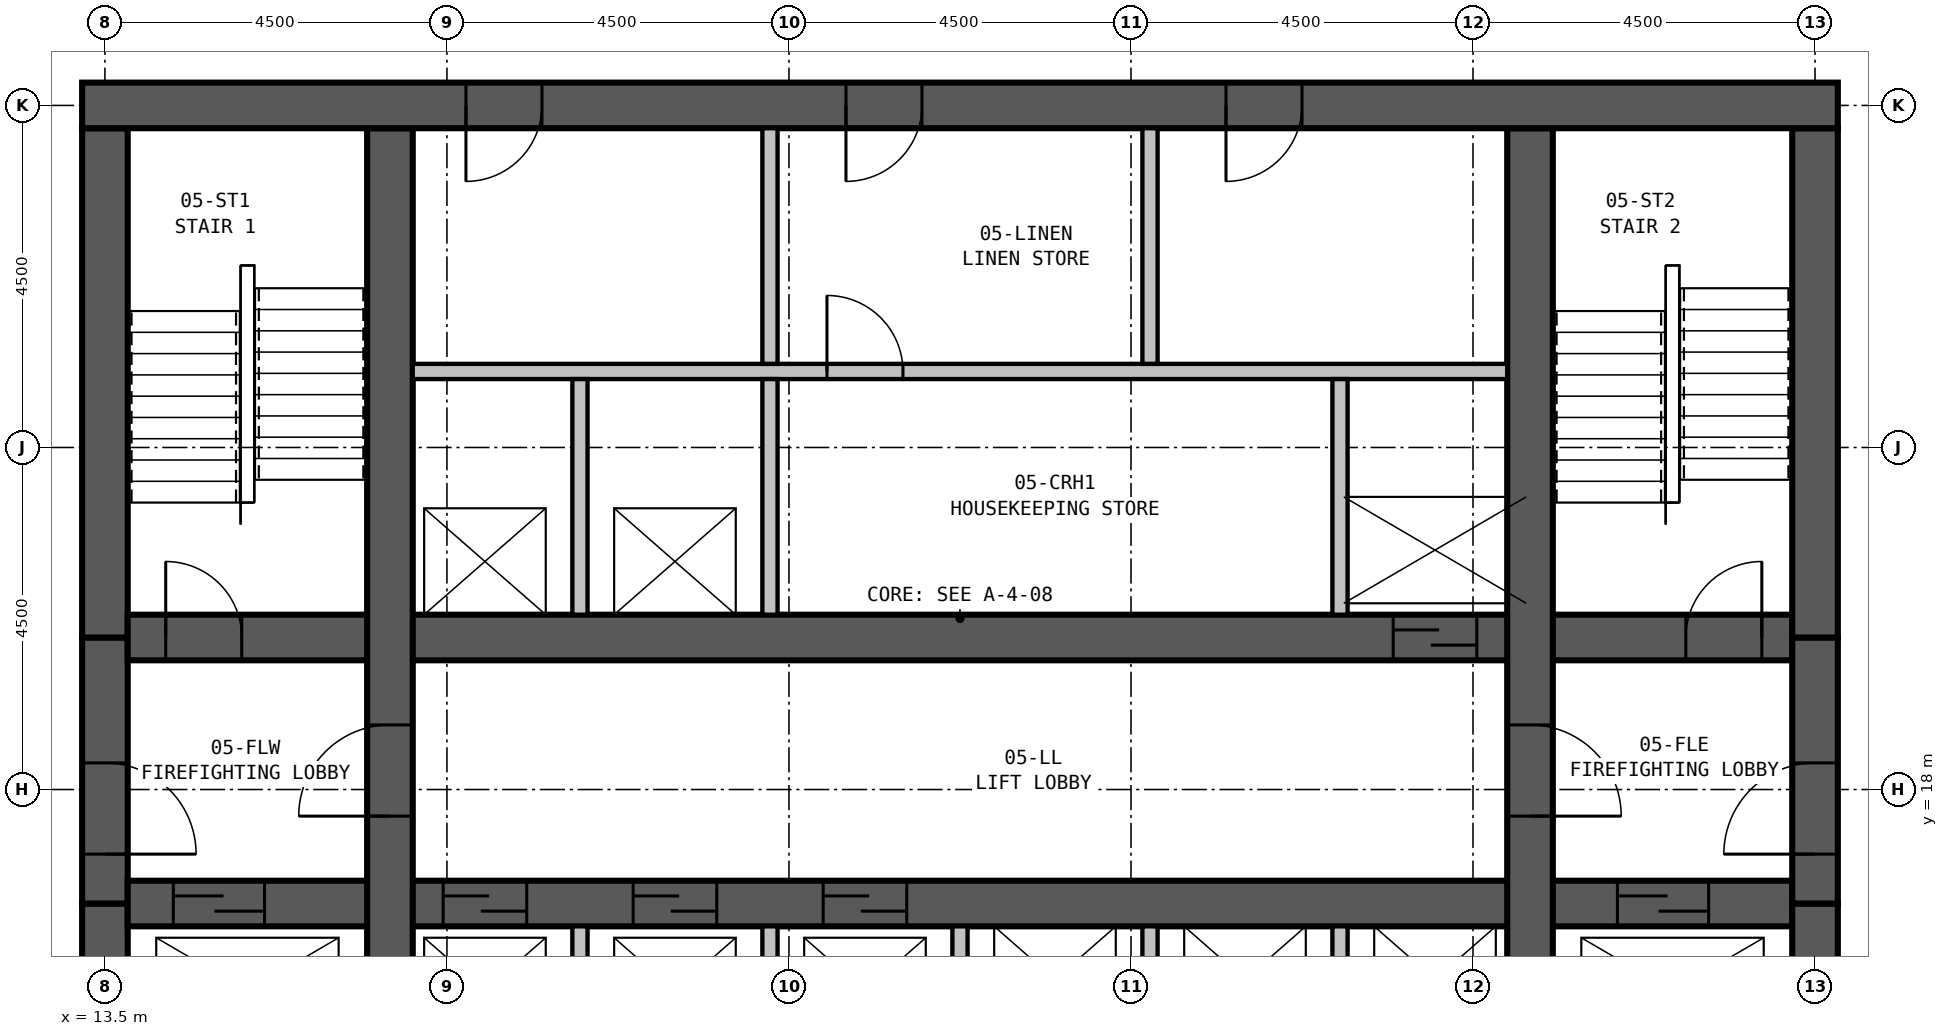
"""IFC4 building model, lengths in metres.
Left out: names, types, materials, properties, quantities, classifications, styles, units other than length and angle.
Written with IfcOpenShell. Run it as: python <this file> out.ifc"""

import sys

from ifc_helpers import new_model, si_unit, direction, frame, frame_2d, origin, place, context, subcontext, project, spatial, rectangle, extrude, element, fill, save


model = new_model("IFC4")
c1 = context("Model", 3, precision=1e-05, world=origin(), true_north=direction((0.0, 1.0)))
c2 = subcontext(c1, "Body", "Model", "MODEL_VIEW")
j1 = project(units=[si_unit("LENGTHUNIT", "METRE"), si_unit("PLANEANGLEUNIT", "RADIAN")], contexts=[c1])
p1 = place(None, origin())
s1 = spatial("IfcSite", under=j1, at=p1, CompositionType="ELEMENT")
p2 = place(p1, origin())
s2 = spatial("IfcBuilding", under=s1, at=p2, CompositionType="ELEMENT")
p3 = place(p2, frame((0.0, 0.0, 29.7)))
s3 = spatial("IfcBuildingStorey", under=s2, at=p3, CompositionType="ELEMENT", Elevation=29.7)
p4 = place(p3, frame((36.3, 27.0, 0.0), z_axis=(0.0, 0.0, 1.0), x_axis=(-1.0, 0.0, 0.0)))
e1 = element("IfcWall", 1, at=p4, inside=s3, PredefinedType="SHEAR", context=c2, shape_type="SweptSolid", body=[
    extrude(rectangle(XDim=23.1, YDim=0.6, at=frame_2d((11.55, 0.0))), origin(), (0.0, 0.0, 1.0), 3.5),
])
p5 = place(p4, frame((17.05, 0.0, 0.0)))
e2 = element("IfcOpeningElement", 2, at=p5, cuts=e1, PredefinedType="OPENING", context=c2, shape_type="SweptSolid", body=[
    extrude(rectangle(XDim=1.0, YDim=2.1, at=frame_2d((0.5, 1.05))), frame((0.0, 0.31, 0.0), z_axis=(0.0, -1.0, 0.0), x_axis=(1.0, 0.0, 0.0)), (0.0, 0.0, 1.0), 0.62),
])
p6 = place(p4, frame((12.05, 0.0, 0.0)))
e3 = element("IfcOpeningElement", 3, at=p6, cuts=e1, PredefinedType="OPENING", context=c2, shape_type="SweptSolid", body=[
    extrude(rectangle(XDim=1.0, YDim=2.1, at=frame_2d((0.5, 1.05))), frame((0.0, 0.31, 0.0), z_axis=(0.0, -1.0, 0.0), x_axis=(1.0, 0.0, 0.0)), (0.0, 0.0, 1.0), 0.62),
])
p7 = place(p4, frame((7.05, 0.0, 0.0)))
e4 = element("IfcOpeningElement", 4, at=p7, cuts=e1, PredefinedType="OPENING", context=c2, shape_type="SweptSolid", body=[
    extrude(rectangle(XDim=1.0, YDim=2.1, at=frame_2d((0.5, 1.05))), frame((0.0, 0.31, 0.0), z_axis=(0.0, -1.0, 0.0), x_axis=(1.0, 0.0, 0.0)), (0.0, 0.0, 1.0), 0.62),
])
p8 = place(p3, frame((17.25, 13.8, 0.0), z_axis=(0.0, 0.0, 1.0), x_axis=(0.0, 1.0, 0.0)))
e5 = element("IfcWall", 5, at=p8, inside=s3, PredefinedType="SHEAR", context=c2, shape_type="SweptSolid", body=[
    extrude(rectangle(XDim=12.9, YDim=0.6, at=frame_2d((6.45, 0.0))), origin(), (0.0, 0.0, 1.0), 3.5),
])
p9 = place(p8, frame((3.85, 0.0, 0.0)))
e6 = element("IfcOpeningElement", 6, at=p9, cuts=e5, PredefinedType="OPENING", context=c2, shape_type="SweptSolid", body=[
    extrude(rectangle(XDim=1.2, YDim=2.1, at=frame_2d((0.6, 1.05))), frame((0.0, 0.31, 0.0), z_axis=(0.0, -1.0, 0.0), x_axis=(1.0, 0.0, 0.0)), (0.0, 0.0, 1.0), 0.62),
])
p10 = place(p3, frame((32.25, 13.8, 0.0), z_axis=(0.0, 0.0, 1.0), x_axis=(0.0, 1.0, 0.0)))
e7 = element("IfcWall", 7, at=p10, inside=s3, PredefinedType="SHEAR", context=c2, shape_type="SweptSolid", body=[
    extrude(rectangle(XDim=12.9, YDim=0.6, at=frame_2d((6.45, 0.0))), origin(), (0.0, 0.0, 1.0), 3.5),
])
p11 = place(p10, frame((5.05, 0.0, 0.0), z_axis=(0.0, 0.0, 1.0), x_axis=(-1.0, 0.0, 0.0)))
e8 = element("IfcOpeningElement", 8, at=p11, cuts=e7, PredefinedType="OPENING", context=c2, shape_type="SweptSolid", body=[
    extrude(rectangle(XDim=1.2, YDim=2.1, at=frame_2d((0.6, 1.05))), frame((0.0, 0.31, 0.0), z_axis=(0.0, -1.0, 0.0), x_axis=(1.0, 0.0, 0.0)), (0.0, 0.0, 1.0), 0.62),
])
p12 = place(p3, frame((13.8, 16.5, 0.0), z_axis=(0.0, 0.0, 1.0), x_axis=(1.0, 0.0, 0.0)))
e9 = element("IfcWall", 9, at=p12, inside=s3, PredefinedType="SHEAR", context=c2, shape_type="SweptSolid", body=[
    extrude(rectangle(XDim=21.9, YDim=0.6, at=frame_2d((10.95, 0.0))), origin(), (0.0, 0.0, 1.0), 3.5),
])
p13 = place(p12, frame((4.15, 0.0, 0.0)))
e10 = element("IfcOpeningElement", 10, at=p13, cuts=e9, PredefinedType="OPENING", context=c2, shape_type="SweptSolid", body=[
    extrude(rectangle(XDim=1.1, YDim=2.1, at=frame_2d((0.55, 1.05))), frame((0.0, 0.31, 0.0), z_axis=(0.0, -1.0, 0.0), x_axis=(1.0, 0.0, 0.0)), (0.0, 0.0, 1.0), 0.62),
])
p14 = place(p12, frame((6.65, 0.0, 0.0)))
e11 = element("IfcOpeningElement", 11, at=p14, cuts=e9, PredefinedType="OPENING", context=c2, shape_type="SweptSolid", body=[
    extrude(rectangle(XDim=1.1, YDim=2.1, at=frame_2d((0.55, 1.05))), frame((0.0, 0.31, 0.0), z_axis=(0.0, -1.0, 0.0), x_axis=(1.0, 0.0, 0.0)), (0.0, 0.0, 1.0), 0.62),
])
p15 = place(p12, frame((9.15, 0.0, 0.0)))
e12 = element("IfcOpeningElement", 12, at=p15, cuts=e9, PredefinedType="OPENING", context=c2, shape_type="SweptSolid", body=[
    extrude(rectangle(XDim=1.1, YDim=2.1, at=frame_2d((0.55, 1.05))), frame((0.0, 0.31, 0.0), z_axis=(0.0, -1.0, 0.0), x_axis=(1.0, 0.0, 0.0)), (0.0, 0.0, 1.0), 0.62),
])
p16 = place(p12, frame((0.6, 0.0, 0.0)))
e13 = element("IfcOpeningElement", 13, at=p16, cuts=e9, PredefinedType="OPENING", context=c2, shape_type="SweptSolid", body=[
    extrude(rectangle(XDim=1.2, YDim=2.1, at=frame_2d((0.6, 1.05))), frame((0.0, 0.31, 0.0), z_axis=(0.0, -1.0, 0.0), x_axis=(1.0, 0.0, 0.0)), (0.0, 0.0, 1.0), 0.62),
])
p17 = place(p12, frame((19.6, 0.0, 0.0)))
e14 = element("IfcOpeningElement", 14, at=p17, cuts=e9, PredefinedType="OPENING", context=c2, shape_type="SweptSolid", body=[
    extrude(rectangle(XDim=1.2, YDim=2.1, at=frame_2d((0.6, 1.05))), frame((0.0, 0.31, 0.0), z_axis=(0.0, -1.0, 0.0), x_axis=(1.0, 0.0, 0.0)), (0.0, 0.0, 1.0), 0.62),
])
p18 = place(p3, frame((13.8, 20.0, 0.0), z_axis=(0.0, 0.0, 1.0), x_axis=(1.0, 0.0, 0.0)))
e15 = element("IfcWall", 15, at=p18, inside=s3, PredefinedType="SHEAR", context=c2, shape_type="SweptSolid", body=[
    extrude(rectangle(XDim=21.9, YDim=0.6, at=frame_2d((10.95, 0.0))), origin(), (0.0, 0.0, 1.0), 3.5),
])
p19 = place(p18, frame((0.5, 0.0, 0.0)))
e16 = element("IfcOpeningElement", 16, at=p19, cuts=e15, PredefinedType="OPENING", context=c2, shape_type="SweptSolid", body=[
    extrude(rectangle(XDim=1.0, YDim=2.1, at=frame_2d((0.5, 1.05))), frame((0.0, 0.31, 0.0), z_axis=(0.0, -1.0, 0.0), x_axis=(1.0, 0.0, 0.0)), (0.0, 0.0, 1.0), 0.62),
])
p20 = place(p18, frame((20.5, 0.0, 0.0)))
e17 = element("IfcOpeningElement", 17, at=p20, cuts=e15, PredefinedType="OPENING", context=c2, shape_type="SweptSolid", body=[
    extrude(rectangle(XDim=1.0, YDim=2.1, at=frame_2d((0.5, 1.05))), frame((0.0, 0.31, 0.0), z_axis=(0.0, -1.0, 0.0), x_axis=(1.0, 0.0, 0.0)), (0.0, 0.0, 1.0), 0.62),
])
p21 = place(p18, frame((16.65, 0.0, 0.0)))
e18 = element("IfcOpeningElement", 18, at=p21, cuts=e15, PredefinedType="OPENING", context=c2, shape_type="SweptSolid", body=[
    extrude(rectangle(XDim=1.1, YDim=2.1, at=frame_2d((0.55, 1.05))), frame((0.0, 0.31, 0.0), z_axis=(0.0, -1.0, 0.0), x_axis=(1.0, 0.0, 0.0)), (0.0, 0.0, 1.0), 0.62),
])
p22 = place(p3, frame((13.5, 26.7, 0.0), z_axis=(0.0, 0.0, 1.0), x_axis=(0.0, -1.0, 0.0)))
e19 = element("IfcWall", 19, at=p22, inside=s3, PredefinedType="SHEAR", context=c2, shape_type="SweptSolid", body=[
    extrude(rectangle(XDim=6.7, YDim=0.6, at=frame_2d((3.35, 0.0))), origin(), (0.0, 0.0, 1.0), 3.5),
])
p23 = place(p3, frame((13.5, 20.0, 0.0), z_axis=(0.0, 0.0, 1.0), x_axis=(0.0, -1.0, 0.0)))
e20 = element("IfcWall", 20, at=p23, inside=s3, PredefinedType="SHEAR", context=c2, shape_type="SweptSolid", body=[
    extrude(rectangle(XDim=3.5, YDim=0.6, at=frame_2d((1.75, 0.0))), origin(), (0.0, 0.0, 1.0), 3.5),
])
p24 = place(p23, frame((1.65, 0.0, 0.0)))
e21 = element("IfcOpeningElement", 21, at=p24, cuts=e20, PredefinedType="OPENING", context=c2, shape_type="SweptSolid", body=[
    extrude(rectangle(XDim=1.2, YDim=2.1, at=frame_2d((0.6, 1.05))), frame((0.0, 0.31, 0.0), z_axis=(0.0, -1.0, 0.0), x_axis=(1.0, 0.0, 0.0)), (0.0, 0.0, 1.0), 0.62),
])
for number, where, z_axis, x_axis in (
    (22, (13.5, 16.5, 0.0), (0.0, 0.0, 1.0), (0.0, -1.0, 0.0)),
    (23, (36.0, 13.8, 0.0), (0.0, 0.0, 1.0), (0.0, 1.0, 0.0)),
):
    element("IfcWall", number, at=place(p3, frame(where, z_axis=z_axis, x_axis=x_axis)), inside=s3, PredefinedType="SHEAR", context=c2, shape_type="SweptSolid", body=[
        extrude(rectangle(XDim=2.7, YDim=0.6, at=frame_2d((1.35, 0.0))), origin(), (0.0, 0.0, 1.0), 3.5),
    ])
p25 = place(p3, frame((36.0, 16.5, 0.0), z_axis=(0.0, 0.0, 1.0), x_axis=(0.0, 1.0, 0.0)))
e24 = element("IfcWall", 24, at=p25, inside=s3, PredefinedType="SHEAR", context=c2, shape_type="SweptSolid", body=[
    extrude(rectangle(XDim=3.5, YDim=0.6, at=frame_2d((1.75, 0.0))), origin(), (0.0, 0.0, 1.0), 3.5),
])
p26 = place(p25, frame((0.65, 0.0, 0.0)))
e25 = element("IfcOpeningElement", 25, at=p26, cuts=e24, PredefinedType="OPENING", context=c2, shape_type="SweptSolid", body=[
    extrude(rectangle(XDim=1.2, YDim=2.1, at=frame_2d((0.6, 1.05))), frame((0.0, 0.31, 0.0), z_axis=(0.0, -1.0, 0.0), x_axis=(1.0, 0.0, 0.0)), (0.0, 0.0, 1.0), 0.62),
])
p27 = place(p3, frame((36.0, 20.0, 0.0), z_axis=(0.0, 0.0, 1.0), x_axis=(0.0, 1.0, 0.0)))
e26 = element("IfcWall", 26, at=p27, inside=s3, PredefinedType="SHEAR", context=c2, shape_type="SweptSolid", body=[
    extrude(rectangle(XDim=6.7, YDim=0.6, at=frame_2d((3.35, 0.0))), origin(), (0.0, 0.0, 1.0), 3.5),
])
p28 = place(p3, frame((19.75, 13.8, 0.0), z_axis=(0.0, 0.0, 1.0), x_axis=(0.0, 1.0, 0.0)))
e27 = element("IfcWall", 27, at=p28, inside=s3, PredefinedType="PARTITIONING", context=c2, shape_type="SweptSolid", body=[
    extrude(rectangle(XDim=2.4, YDim=0.2, at=frame_2d((1.2, 0.0))), origin(), (0.0, 0.0, 1.0), 3.25),
])
p29 = place(p3, frame((19.75, 20.3, 0.0), z_axis=(0.0, 0.0, 1.0), x_axis=(0.0, 1.0, 0.0)))
e28 = element("IfcWall", 28, at=p29, inside=s3, PredefinedType="PARTITIONING", context=c2, shape_type="SweptSolid", body=[
    extrude(rectangle(XDim=3.1, YDim=0.2, at=frame_2d((1.55, 0.0))), origin(), (0.0, 0.0, 1.0), 3.25),
])
p30 = place(p3, frame((22.25, 13.8, 0.0), z_axis=(0.0, 0.0, 1.0), x_axis=(0.0, 1.0, 0.0)))
e29 = element("IfcWall", 29, at=p30, inside=s3, PredefinedType="PARTITIONING", context=c2, shape_type="SweptSolid", body=[
    extrude(rectangle(XDim=2.4, YDim=0.2, at=frame_2d((1.2, 0.0))), origin(), (0.0, 0.0, 1.0), 3.25),
])
p31 = place(p3, frame((22.25, 20.3, 0.0), z_axis=(0.0, 0.0, 1.0), x_axis=(0.0, 1.0, 0.0)))
e30 = element("IfcWall", 30, at=p31, inside=s3, PredefinedType="PARTITIONING", context=c2, shape_type="SweptSolid", body=[
    extrude(rectangle(XDim=3.1, YDim=0.2, at=frame_2d((1.55, 0.0))), origin(), (0.0, 0.0, 1.0), 3.25),
])
for number, where, z_axis, x_axis in (
    (31, (24.75, 13.8, 0.0), (0.0, 0.0, 1.0), (0.0, 1.0, 0.0)),
    (32, (27.25, 13.8, 0.0), (0.0, 0.0, 1.0), (0.0, 1.0, 0.0)),
    (33, (29.75, 13.8, 0.0), (0.0, 0.0, 1.0), (0.0, 1.0, 0.0)),
):
    element("IfcWall", number, at=place(p3, frame(where, z_axis=z_axis, x_axis=x_axis)), inside=s3, PredefinedType="PARTITIONING", context=c2, shape_type="SweptSolid", body=[
        extrude(rectangle(XDim=2.4, YDim=0.2, at=frame_2d((1.2, 0.0))), origin(), (0.0, 0.0, 1.0), 3.25),
    ])
p32 = place(p3, frame((29.75, 20.3, 0.0), z_axis=(0.0, 0.0, 1.0), x_axis=(0.0, 1.0, 0.0)))
e34 = element("IfcWall", 34, at=p32, inside=s3, PredefinedType="PARTITIONING", context=c2, shape_type="SweptSolid", body=[
    extrude(rectangle(XDim=3.1, YDim=0.2, at=frame_2d((1.55, 0.0))), origin(), (0.0, 0.0, 1.0), 3.25),
])
p33 = place(p3, frame((17.55, 23.5, 0.0), z_axis=(0.0, 0.0, 1.0), x_axis=(1.0, 0.0, 0.0)))
e35 = element("IfcWall", 35, at=p33, inside=s3, PredefinedType="PARTITIONING", context=c2, shape_type="SweptSolid", body=[
    extrude(rectangle(XDim=14.4, YDim=0.2, at=frame_2d((7.2, 0.0))), origin(), (0.0, 0.0, 1.0), 3.25),
])
p34 = place(p33, frame((5.45, 0.0, 0.0)))
e36 = element("IfcOpeningElement", 36, at=p34, cuts=e35, PredefinedType="OPENING", context=c2, shape_type="SweptSolid", body=[
    extrude(rectangle(XDim=1.0, YDim=2.1, at=frame_2d((0.5, 1.05))), frame((0.0, 0.11, 0.0), z_axis=(0.0, -1.0, 0.0), x_axis=(1.0, 0.0, 0.0)), (0.0, 0.0, 1.0), 0.22),
])
for number, where, z_axis, x_axis in (
    (37, (22.25, 23.6, 0.0), (0.0, 0.0, 1.0), (0.0, 1.0, 0.0)),
    (38, (27.25, 23.6, 0.0), (0.0, 0.0, 1.0), (0.0, 1.0, 0.0)),
):
    element("IfcWall", number, at=place(p3, frame(where, z_axis=z_axis, x_axis=x_axis)), inside=s3, PredefinedType="PARTITIONING", context=c2, shape_type="SweptSolid", body=[
        extrude(rectangle(XDim=3.1, YDim=0.2, at=frame_2d((1.55, 0.0))), origin(), (0.0, 0.0, 1.0), 3.25),
    ])
p35 = place(p34, origin())
e39 = element("IfcDoor", 39, at=p35, inside=s3, OperationType="SINGLE_SWING_LEFT", PredefinedType="DOOR", context=c2, shape_type="SweptSolid", body=[
    extrude(rectangle(XDim=1.0, YDim=2.1, at=frame_2d((0.5, 1.05))), frame((0.0, 0.025, 0.0), z_axis=(0.0, -1.0, 0.0), x_axis=(1.0, 0.0, 0.0)), (0.0, 0.0, 1.0), 0.05),
])
fill(e36, e39)
p36 = place(p24, origin())
e40 = element("IfcDoor", 40, at=p36, inside=s3, OperationType="SINGLE_SWING_RIGHT", PredefinedType="DOOR", context=c2, shape_type="SweptSolid", body=[
    extrude(rectangle(XDim=1.2, YDim=2.1, at=frame_2d((0.6, 1.05))), frame((0.0, 0.3, 0.0), z_axis=(0.0, -1.0, 0.0), x_axis=(1.0, 0.0, 0.0)), (0.0, 0.0, 1.0), 0.6),
])
fill(e21, e40)
p37 = place(p26, origin())
e41 = element("IfcDoor", 41, at=p37, inside=s3, OperationType="SINGLE_SWING_LEFT", PredefinedType="DOOR", context=c2, shape_type="SweptSolid", body=[
    extrude(rectangle(XDim=1.2, YDim=2.1, at=frame_2d((0.6, 1.05))), frame((0.0, 0.3, 0.0), z_axis=(0.0, -1.0, 0.0), x_axis=(1.0, 0.0, 0.0)), (0.0, 0.0, 1.0), 0.6),
])
fill(e25, e41)
p38 = place(p9, origin())
e42 = element("IfcDoor", 42, at=p38, inside=s3, OperationType="SINGLE_SWING_LEFT", PredefinedType="DOOR", context=c2, shape_type="SweptSolid", body=[
    extrude(rectangle(XDim=1.2, YDim=2.1, at=frame_2d((0.6, 1.05))), frame((0.0, 0.3, 0.0), z_axis=(0.0, -1.0, 0.0), x_axis=(1.0, 0.0, 0.0)), (0.0, 0.0, 1.0), 0.6),
])
fill(e6, e42)
p39 = place(p11, origin())
e43 = element("IfcDoor", 43, at=p39, inside=s3, OperationType="SINGLE_SWING_RIGHT", PredefinedType="DOOR", context=c2, shape_type="SweptSolid", body=[
    extrude(rectangle(XDim=1.2, YDim=2.1, at=frame_2d((0.6, 1.05))), frame((0.0, 0.3, 0.0), z_axis=(0.0, -1.0, 0.0), x_axis=(1.0, 0.0, 0.0)), (0.0, 0.0, 1.0), 0.6),
])
fill(e8, e43)
p40 = place(p19, origin())
e44 = element("IfcDoor", 44, at=p40, inside=s3, OperationType="SINGLE_SWING_LEFT", PredefinedType="DOOR", context=c2, shape_type="SweptSolid", body=[
    extrude(rectangle(XDim=1.0, YDim=2.1, at=frame_2d((0.5, 1.05))), frame((0.0, 0.3, 0.0), z_axis=(0.0, -1.0, 0.0), x_axis=(1.0, 0.0, 0.0)), (0.0, 0.0, 1.0), 0.6),
])
fill(e16, e44)
p41 = place(p20, origin())
e45 = element("IfcDoor", 45, at=p41, inside=s3, OperationType="SINGLE_SWING_RIGHT", PredefinedType="DOOR", context=c2, shape_type="SweptSolid", body=[
    extrude(rectangle(XDim=1.0, YDim=2.1, at=frame_2d((0.5, 1.05))), frame((0.0, 0.3, 0.0), z_axis=(0.0, -1.0, 0.0), x_axis=(1.0, 0.0, 0.0)), (0.0, 0.0, 1.0), 0.6),
])
fill(e17, e45)
p42 = place(p13, origin())
e46 = element("IfcDoor", 46, at=p42, inside=s3, OperationType="SLIDING_TO_LEFT", PredefinedType="DOOR", context=c2, shape_type="SweptSolid", body=[
    extrude(rectangle(XDim=1.1, YDim=2.1, at=frame_2d((0.55, 1.05))), frame((0.0, 0.3, 0.0), z_axis=(0.0, -1.0, 0.0), x_axis=(1.0, 0.0, 0.0)), (0.0, 0.0, 1.0), 0.6),
])
fill(e10, e46)
p43 = place(p14, origin())
e47 = element("IfcDoor", 47, at=p43, inside=s3, OperationType="SLIDING_TO_LEFT", PredefinedType="DOOR", context=c2, shape_type="SweptSolid", body=[
    extrude(rectangle(XDim=1.1, YDim=2.1, at=frame_2d((0.55, 1.05))), frame((0.0, 0.3, 0.0), z_axis=(0.0, -1.0, 0.0), x_axis=(1.0, 0.0, 0.0)), (0.0, 0.0, 1.0), 0.6),
])
fill(e11, e47)
p44 = place(p15, origin())
e48 = element("IfcDoor", 48, at=p44, inside=s3, OperationType="SLIDING_TO_LEFT", PredefinedType="DOOR", context=c2, shape_type="SweptSolid", body=[
    extrude(rectangle(XDim=1.1, YDim=2.1, at=frame_2d((0.55, 1.05))), frame((0.0, 0.3, 0.0), z_axis=(0.0, -1.0, 0.0), x_axis=(1.0, 0.0, 0.0)), (0.0, 0.0, 1.0), 0.6),
])
fill(e12, e48)
p45 = place(p21, origin())
e49 = element("IfcDoor", 49, at=p45, inside=s3, OperationType="SLIDING_TO_LEFT", PredefinedType="DOOR", context=c2, shape_type="SweptSolid", body=[
    extrude(rectangle(XDim=1.1, YDim=2.1, at=frame_2d((0.55, 1.05))), frame((0.0, 0.3, 0.0), z_axis=(0.0, -1.0, 0.0), x_axis=(1.0, 0.0, 0.0)), (0.0, 0.0, 1.0), 0.6),
])
fill(e18, e49)
p46 = place(p16, origin())
e50 = element("IfcDoor", 50, at=p46, inside=s3, OperationType="SLIDING_TO_LEFT", PredefinedType="DOOR", context=c2, shape_type="SweptSolid", body=[
    extrude(rectangle(XDim=1.2, YDim=2.1, at=frame_2d((0.6, 1.05))), frame((0.0, 0.3, 0.0), z_axis=(0.0, -1.0, 0.0), x_axis=(1.0, 0.0, 0.0)), (0.0, 0.0, 1.0), 0.6),
])
fill(e13, e50)
p47 = place(p17, origin())
e51 = element("IfcDoor", 51, at=p47, inside=s3, OperationType="SLIDING_TO_LEFT", PredefinedType="DOOR", context=c2, shape_type="SweptSolid", body=[
    extrude(rectangle(XDim=1.2, YDim=2.1, at=frame_2d((0.6, 1.05))), frame((0.0, 0.3, 0.0), z_axis=(0.0, -1.0, 0.0), x_axis=(1.0, 0.0, 0.0)), (0.0, 0.0, 1.0), 0.6),
])
fill(e14, e51)
p48 = place(p5, origin())
e52 = element("IfcDoor", 52, at=p48, inside=s3, OperationType="SINGLE_SWING_RIGHT", PredefinedType="DOOR", context=c2, shape_type="SweptSolid", body=[
    extrude(rectangle(XDim=1.0, YDim=2.1, at=frame_2d((0.5, 1.05))), frame((0.0, 0.3, 0.0), z_axis=(0.0, -1.0, 0.0), x_axis=(1.0, 0.0, 0.0)), (0.0, 0.0, 1.0), 0.6),
])
fill(e2, e52)
p49 = place(p6, origin())
e53 = element("IfcDoor", 53, at=p49, inside=s3, OperationType="SINGLE_SWING_RIGHT", PredefinedType="DOOR", context=c2, shape_type="SweptSolid", body=[
    extrude(rectangle(XDim=1.0, YDim=2.1, at=frame_2d((0.5, 1.05))), frame((0.0, 0.3, 0.0), z_axis=(0.0, -1.0, 0.0), x_axis=(1.0, 0.0, 0.0)), (0.0, 0.0, 1.0), 0.6),
])
fill(e3, e53)
p50 = place(p7, origin())
e54 = element("IfcDoor", 54, at=p50, inside=s3, OperationType="SINGLE_SWING_RIGHT", PredefinedType="DOOR", context=c2, shape_type="SweptSolid", body=[
    extrude(rectangle(XDim=1.0, YDim=2.1, at=frame_2d((0.5, 1.05))), frame((0.0, 0.3, 0.0), z_axis=(0.0, -1.0, 0.0), x_axis=(1.0, 0.0, 0.0)), (0.0, 0.0, 1.0), 0.6),
])
fill(e4, e54)
save(model, sys.argv[1])
